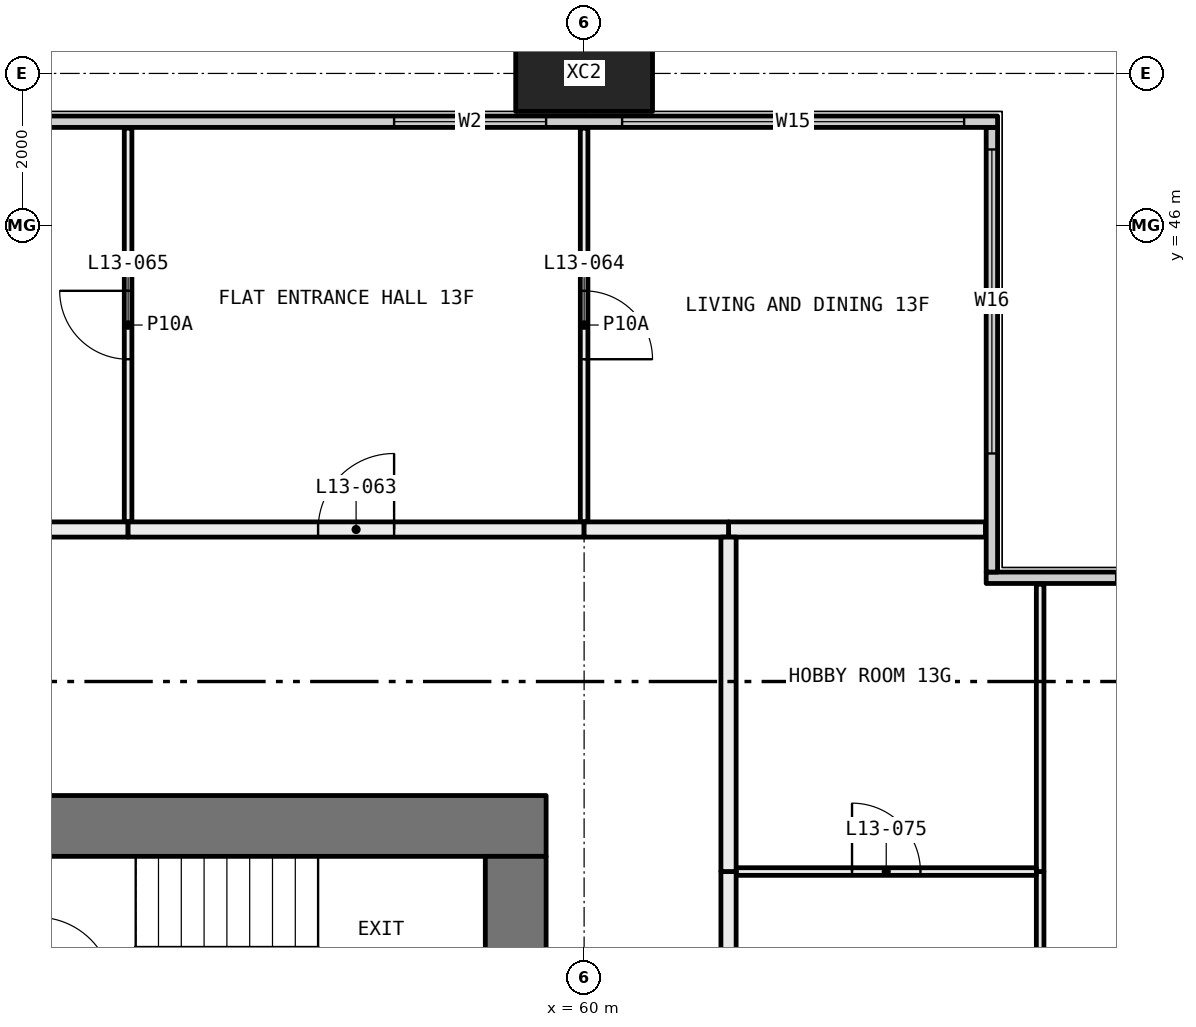
"""IFC4 building model, lengths in metres.
Left out: names, types, materials, properties, quantities, classifications, styles, units other than length and angle.
Written with IfcOpenShell. Run it as: python <this file> out.ifc"""

import sys

from ifc_helpers import new_model, si_unit, direction, frame, frame_2d, origin, origin_2d, place, context, subcontext, project, spatial, rectangle, hollow_rectangle, extrude, element, fill, save


model = new_model("IFC4")
c1 = context("Model", 3, precision=1e-05, world=origin(), true_north=direction((0.0, 1.0)))
c2 = subcontext(c1, "Body", "Model", "MODEL_VIEW")
j1 = project(units=[si_unit("LENGTHUNIT", "METRE"), si_unit("PLANEANGLEUNIT", "RADIAN")], contexts=[c1])
p1 = place(None, origin())
s1 = spatial("IfcSite", under=j1, at=p1, CompositionType="ELEMENT")
p2 = place(p1, origin())
s2 = spatial("IfcBuilding", under=s1, at=p2, CompositionType="ELEMENT")
p3 = place(p2, frame((0.0, 0.0, 57.6)))
s3 = spatial("IfcBuildingStorey", under=s2, at=p3, CompositionType="ELEMENT", Elevation=57.6)
p4 = place(p3, frame((60.0, 48.0, -0.4), z_axis=(0.0, 0.0, 1.0), x_axis=(1.0, 0.0, 0.0)))
e1 = element("IfcColumn", 1, at=p4, inside=s3, PredefinedType="COLUMN", context=c2, shape_type="SweptSolid", body=[
    extrude(hollow_rectangle(XDim=1.8, YDim=1.0, WallThickness=0.07, at=origin_2d()), origin(), (0.0, 0.0, 1.0), 3.45),
])
p5 = place(p3, frame((65.29, 41.365, 0.0), z_axis=(0.0, 0.0, 1.0), x_axis=(1.0, 0.0, 0.0)))
e2 = element("IfcWall", 2, at=p5, inside=s3, PredefinedType="ELEMENTEDWALL", context=c2, shape_type="SweptSolid", body=[
    extrude(rectangle(XDim=6.15, YDim=0.15, at=frame_2d((3.075, 0.0))), origin(), (0.0, 0.0, 1.0), 3.05),
])
p6 = place(p5, frame((1.71, 0.0, 0.45)))
e3 = element("IfcOpeningElement", 3, at=p6, cuts=e2, PredefinedType="OPENING", context=c2, shape_type="SweptSolid", body=[
    extrude(rectangle(XDim=4.0, YDim=2.55, at=frame_2d((2.0, 1.275))), frame((0.0, 0.085, 0.0), z_axis=(0.0, -1.0, 0.0), x_axis=(1.0, 0.0, 0.0)), (0.0, 0.0, 1.0), 0.17),
])
p7 = place(p3, frame((65.365, 41.44, 0.0), z_axis=(0.0, 0.0, 1.0), x_axis=(0.0, 1.0, 0.0)))
e4 = element("IfcWall", 4, at=p7, inside=s3, PredefinedType="ELEMENTEDWALL", context=c2, shape_type="SweptSolid", body=[
    extrude(rectangle(XDim=5.85, YDim=0.15, at=frame_2d((2.925, 0.0))), origin(), (0.0, 0.0, 1.0), 3.05),
])
p8 = place(p7, frame((1.56, 0.0, 0.45)))
e5 = element("IfcOpeningElement", 5, at=p8, cuts=e4, PredefinedType="OPENING", context=c2, shape_type="SweptSolid", body=[
    extrude(rectangle(XDim=4.0, YDim=2.55, at=frame_2d((2.0, 1.275))), frame((0.0, 0.085, 0.0), z_axis=(0.0, -1.0, 0.0), x_axis=(1.0, 0.0, 0.0)), (0.0, 0.0, 1.0), 0.17),
])
p9 = place(p3, frame((6.56, 47.365, 0.0), z_axis=(0.0, 0.0, 1.0), x_axis=(1.0, 0.0, 0.0)))
e6 = element("IfcWall", 6, at=p9, inside=s3, PredefinedType="ELEMENTEDWALL", context=c2, shape_type="SweptSolid", body=[
    extrude(rectangle(XDim=58.88, YDim=0.15, at=frame_2d((29.44, 0.0))), origin(), (0.0, 0.0, 1.0), 3.05),
])
p10 = place(p9, frame((0.44, 0.0, 0.45)))
e7 = element("IfcOpeningElement", 7, at=p10, cuts=e6, PredefinedType="OPENING", context=c2, shape_type="SweptSolid", body=[
    extrude(rectangle(XDim=4.5, YDim=2.55, at=frame_2d((2.25, 1.275))), frame((0.0, 0.085, 0.0), z_axis=(0.0, -1.0, 0.0), x_axis=(1.0, 0.0, 0.0)), (0.0, 0.0, 1.0), 0.17),
])
p11 = place(p9, frame((5.94, 0.0, 0.45)))
e8 = element("IfcOpeningElement", 8, at=p11, cuts=e6, PredefinedType="OPENING", context=c2, shape_type="SweptSolid", body=[
    extrude(rectangle(XDim=3.25, YDim=2.55, at=frame_2d((1.625, 1.275))), frame((0.0, 0.085, 0.0), z_axis=(0.0, -1.0, 0.0), x_axis=(1.0, 0.0, 0.0)), (0.0, 0.0, 1.0), 0.17),
])
p12 = place(p9, frame((13.69, 0.0, 0.45)))
e9 = element("IfcOpeningElement", 9, at=p12, cuts=e6, PredefinedType="OPENING", context=c2, shape_type="SweptSolid", body=[
    extrude(rectangle(XDim=3.25, YDim=2.55, at=frame_2d((1.625, 1.275))), frame((0.0, 0.085, 0.0), z_axis=(0.0, -1.0, 0.0), x_axis=(1.0, 0.0, 0.0)), (0.0, 0.0, 1.0), 0.17),
])
p13 = place(p9, frame((17.94, 0.0, 0.45)))
e10 = element("IfcOpeningElement", 10, at=p13, cuts=e6, PredefinedType="OPENING", context=c2, shape_type="SweptSolid", body=[
    extrude(rectangle(XDim=3.25, YDim=2.55, at=frame_2d((1.625, 1.275))), frame((0.0, 0.085, 0.0), z_axis=(0.0, -1.0, 0.0), x_axis=(1.0, 0.0, 0.0)), (0.0, 0.0, 1.0), 0.17),
])
p14 = place(p9, frame((26.94, 0.0, 0.45)))
e11 = element("IfcOpeningElement", 11, at=p14, cuts=e6, PredefinedType="OPENING", context=c2, shape_type="SweptSolid", body=[
    extrude(rectangle(XDim=2.0, YDim=2.55, at=frame_2d((1.0, 1.275))), frame((0.0, 0.085, 0.0), z_axis=(0.0, -1.0, 0.0), x_axis=(1.0, 0.0, 0.0)), (0.0, 0.0, 1.0), 0.17),
])
p15 = place(p9, frame((29.94, 0.0, 0.45)))
e12 = element("IfcOpeningElement", 12, at=p15, cuts=e6, PredefinedType="OPENING", context=c2, shape_type="SweptSolid", body=[
    extrude(rectangle(XDim=3.25, YDim=2.55, at=frame_2d((1.625, 1.275))), frame((0.0, 0.085, 0.0), z_axis=(0.0, -1.0, 0.0), x_axis=(1.0, 0.0, 0.0)), (0.0, 0.0, 1.0), 0.17),
])
p16 = place(p9, frame((37.69, 0.0, 0.45)))
e13 = element("IfcOpeningElement", 13, at=p16, cuts=e6, PredefinedType="OPENING", context=c2, shape_type="SweptSolid", body=[
    extrude(rectangle(XDim=3.25, YDim=2.55, at=frame_2d((1.625, 1.275))), frame((0.0, 0.085, 0.0), z_axis=(0.0, -1.0, 0.0), x_axis=(1.0, 0.0, 0.0)), (0.0, 0.0, 1.0), 0.17),
])
p17 = place(p9, frame((41.94, 0.0, 0.45)))
e14 = element("IfcOpeningElement", 14, at=p17, cuts=e6, PredefinedType="OPENING", context=c2, shape_type="SweptSolid", body=[
    extrude(rectangle(XDim=3.25, YDim=2.55, at=frame_2d((1.625, 1.275))), frame((0.0, 0.085, 0.0), z_axis=(0.0, -1.0, 0.0), x_axis=(1.0, 0.0, 0.0)), (0.0, 0.0, 1.0), 0.17),
])
p18 = place(p9, frame((50.94, 0.0, 0.45)))
e15 = element("IfcOpeningElement", 15, at=p18, cuts=e6, PredefinedType="OPENING", context=c2, shape_type="SweptSolid", body=[
    extrude(rectangle(XDim=2.0, YDim=2.55, at=frame_2d((1.0, 1.275))), frame((0.0, 0.085, 0.0), z_axis=(0.0, -1.0, 0.0), x_axis=(1.0, 0.0, 0.0)), (0.0, 0.0, 1.0), 0.17),
])
p19 = place(p9, frame((53.94, 0.0, 0.45)))
e16 = element("IfcOpeningElement", 16, at=p19, cuts=e6, PredefinedType="OPENING", context=c2, shape_type="SweptSolid", body=[
    extrude(rectangle(XDim=4.5, YDim=2.55, at=frame_2d((2.25, 1.275))), frame((0.0, 0.085, 0.0), z_axis=(0.0, -1.0, 0.0), x_axis=(1.0, 0.0, 0.0)), (0.0, 0.0, 1.0), 0.17),
])
p20 = place(p3, frame((54.0, 42.1, 0.0), z_axis=(0.0, 0.0, 1.0), x_axis=(0.0, 1.0, 0.0)))
e17 = element("IfcWall", 17, at=p20, inside=s3, PredefinedType="PARTITIONING", context=c2, shape_type="SweptSolid", body=[
    extrude(rectangle(XDim=5.18, YDim=0.1, at=frame_2d((2.59, 0.0))), origin(), (0.0, 0.0, 1.0), 3.05),
])
p21 = place(p20, frame((2.14, 0.0, 0.0)))
e18 = element("IfcOpeningElement", 18, at=p21, cuts=e17, PredefinedType="OPENING", context=c2, shape_type="SweptSolid", body=[
    extrude(rectangle(XDim=0.9, YDim=2.1, at=frame_2d((0.45, 1.05))), frame((0.0, 0.06, 0.0), z_axis=(0.0, -1.0, 0.0), x_axis=(1.0, 0.0, 0.0)), (0.0, 0.0, 1.0), 0.12),
])
p22 = place(p3, frame((48.0, 42.0, 0.0), z_axis=(0.0, 0.0, 1.0), x_axis=(1.0, 0.0, 0.0)))
e19 = element("IfcWall", 19, at=p22, inside=s3, PredefinedType="PARTITIONING", context=c2, shape_type="SweptSolid", body=[
    extrude(rectangle(XDim=6.0, YDim=0.2, at=frame_2d((3.0, 0.0))), origin(), (0.0, 0.0, 1.0), 3.05),
])
p23 = place(p3, frame((60.0, 42.1, 0.0), z_axis=(0.0, 0.0, 1.0), x_axis=(0.0, 1.0, 0.0)))
e20 = element("IfcWall", 20, at=p23, inside=s3, PredefinedType="PARTITIONING", context=c2, shape_type="SweptSolid", body=[
    extrude(rectangle(XDim=5.18, YDim=0.1, at=frame_2d((2.59, 0.0))), origin(), (0.0, 0.0, 1.0), 3.05),
])
p24 = place(p23, frame((2.14, 0.0, 0.0)))
e21 = element("IfcOpeningElement", 21, at=p24, cuts=e20, PredefinedType="OPENING", context=c2, shape_type="SweptSolid", body=[
    extrude(rectangle(XDim=0.9, YDim=2.1, at=frame_2d((0.45, 1.05))), frame((0.0, 0.06, 0.0), z_axis=(0.0, -1.0, 0.0), x_axis=(1.0, 0.0, 0.0)), (0.0, 0.0, 1.0), 0.12),
])
p25 = place(p3, frame((54.0, 42.0, 0.0), z_axis=(0.0, 0.0, 1.0), x_axis=(1.0, 0.0, 0.0)))
e22 = element("IfcWall", 22, at=p25, inside=s3, PredefinedType="PARTITIONING", context=c2, shape_type="SweptSolid", body=[
    extrude(rectangle(XDim=6.0, YDim=0.2, at=frame_2d((3.0, 0.0))), origin(), (0.0, 0.0, 1.0), 3.05),
])
p26 = place(p25, frame((2.5, 0.0, 0.0)))
e23 = element("IfcOpeningElement", 23, at=p26, cuts=e22, PredefinedType="OPENING", context=c2, shape_type="SweptSolid", body=[
    extrude(rectangle(XDim=1.0, YDim=2.1, at=frame_2d((0.5, 1.05))), frame((0.0, 0.11, 0.0), z_axis=(0.0, -1.0, 0.0), x_axis=(1.0, 0.0, 0.0)), (0.0, 0.0, 1.0), 0.22),
])
p27 = place(p3, frame((61.9, 42.0, 0.0), z_axis=(0.0, 0.0, 1.0), x_axis=(1.0, 0.0, 0.0)))
e24 = element("IfcWall", 24, at=p27, inside=s3, PredefinedType="PARTITIONING", context=c2, shape_type="SweptSolid", body=[
    extrude(rectangle(XDim=3.38, YDim=0.2, at=frame_2d((1.69, 0.0))), origin(), (0.0, 0.0, 1.0), 3.05),
])
p28 = place(p3, frame((60.0, 42.0, 0.0), z_axis=(0.0, 0.0, 1.0), x_axis=(1.0, 0.0, 0.0)))
e25 = element("IfcWall", 25, at=p28, inside=s3, PredefinedType="PARTITIONING", context=c2, shape_type="SweptSolid", body=[
    extrude(rectangle(XDim=1.9, YDim=0.2, at=frame_2d((0.95, 0.0))), origin(), (0.0, 0.0, 1.0), 3.05),
])
p29 = place(p3, frame((66.0, 37.5, 0.0), z_axis=(0.0, 0.0, 1.0), x_axis=(0.0, -1.0, 0.0)))
e26 = element("IfcWall", 26, at=p29, inside=s3, PredefinedType="PARTITIONING", context=c2, shape_type="SweptSolid", body=[
    extrude(rectangle(XDim=1.6, YDim=0.1, at=frame_2d((0.8, 0.0))), origin(), (0.0, 0.0, 1.0), 2.45),
])
p30 = place(p3, frame((66.0, 41.28, 0.0), z_axis=(0.0, 0.0, 1.0), x_axis=(0.0, -1.0, 0.0)))
e27 = element("IfcWall", 27, at=p30, inside=s3, PredefinedType="PARTITIONING", context=c2, shape_type="SweptSolid", body=[
    extrude(rectangle(XDim=3.78, YDim=0.1, at=frame_2d((1.89, 0.0))), origin(), (0.0, 0.0, 1.0), 3.05),
])
p31 = place(p3, frame((65.95, 37.5, 0.0), z_axis=(0.0, 0.0, 1.0), x_axis=(-1.0, 0.0, 0.0)))
e28 = element("IfcWall", 28, at=p31, inside=s3, PredefinedType="PARTITIONING", context=c2, shape_type="SweptSolid", body=[
    extrude(rectangle(XDim=3.95, YDim=0.1, at=frame_2d((1.975, 0.0))), origin(), (0.0, 0.0, 1.0), 3.05),
])
p32 = place(p31, frame((1.525, 0.0, 0.0)))
e29 = element("IfcOpeningElement", 29, at=p32, cuts=e28, PredefinedType="OPENING", context=c2, shape_type="SweptSolid", body=[
    extrude(rectangle(XDim=0.9, YDim=2.1, at=frame_2d((0.45, 1.05))), frame((0.0, 0.06, 0.0), z_axis=(0.0, -1.0, 0.0), x_axis=(1.0, 0.0, 0.0)), (0.0, 0.0, 1.0), 0.12),
])
p33 = place(p3, frame((61.9, 37.5, 0.0), z_axis=(0.0, 0.0, 1.0), x_axis=(0.0, -1.0, 0.0)))
e30 = element("IfcWall", 30, at=p33, inside=s3, PredefinedType="PARTITIONING", context=c2, shape_type="SweptSolid", body=[
    extrude(rectangle(XDim=1.6, YDim=0.2, at=frame_2d((0.8, 0.0))), origin(), (0.0, 0.0, 1.0), 2.45),
])
p34 = place(p3, frame((61.9, 41.9, 0.0), z_axis=(0.0, 0.0, 1.0), x_axis=(0.0, -1.0, 0.0)))
e31 = element("IfcWall", 31, at=p34, inside=s3, PredefinedType="PARTITIONING", context=c2, shape_type="SweptSolid", body=[
    extrude(rectangle(XDim=4.4, YDim=0.2, at=frame_2d((2.2, 0.0))), origin(), (0.0, 0.0, 1.0), 3.05),
])
p35 = place(p3, frame((59.5, 38.1, 0.0), z_axis=(0.0, 0.0, 1.0), x_axis=(-1.0, 0.0, 0.0)))
e32 = element("IfcWall", 32, at=p35, inside=s3, PredefinedType="SHEAR", context=c2, shape_type="SweptSolid", body=[
    extrude(rectangle(XDim=11.0, YDim=0.8, at=frame_2d((5.5, 0.0))), origin(), (0.0, 0.0, 1.0), 3.05),
])
p36 = place(p35, frame((8.4, 0.0, 0.0)))
e33 = element("IfcOpeningElement", 33, at=p36, cuts=e32, PredefinedType="OPENING", context=c2, shape_type="SweptSolid", body=[
    extrude(rectangle(XDim=1.6, YDim=2.1, at=frame_2d((0.8, 1.05))), frame((0.0, 0.41, 0.0), z_axis=(0.0, -1.0, 0.0), x_axis=(1.0, 0.0, 0.0)), (0.0, 0.0, 1.0), 0.82),
])
p37 = place(p3, frame((59.1, 22.3, 0.0), z_axis=(0.0, 0.0, 1.0), x_axis=(0.0, 1.0, 0.0)))
e34 = element("IfcWall", 34, at=p37, inside=s3, PredefinedType="SHEAR", context=c2, shape_type="SweptSolid", body=[
    extrude(rectangle(XDim=15.4, YDim=0.8, at=frame_2d((7.7, 0.0))), origin(), (0.0, 0.0, 1.0), 3.05),
])
p38 = place(p37, frame((8.15, 0.0, 0.0)))
e35 = element("IfcOpeningElement", 35, at=p38, cuts=e34, PredefinedType="OPENING", context=c2, shape_type="SweptSolid", body=[
    extrude(rectangle(XDim=1.6, YDim=2.1, at=frame_2d((0.8, 1.05))), frame((0.0, 0.41, 0.0), z_axis=(0.0, -1.0, 0.0), x_axis=(1.0, 0.0, 0.0)), (0.0, 0.0, 1.0), 0.82),
])
p39 = place(p37, frame((2.05, 0.0, 0.0)))
e36 = element("IfcOpeningElement", 36, at=p39, cuts=e34, PredefinedType="OPENING", context=c2, shape_type="SweptSolid", body=[
    extrude(rectangle(XDim=1.0, YDim=2.1, at=frame_2d((0.5, 1.05))), frame((0.0, 0.41, 0.0), z_axis=(0.0, -1.0, 0.0), x_axis=(1.0, 0.0, 0.0)), (0.0, 0.0, 1.0), 0.82),
])
p40 = place(p8, origin())
e37 = element("IfcWindow", 37, at=p40, inside=s3, PartitioningType="SINGLE_PANEL", PredefinedType="WINDOW", context=c2, shape_type="SweptSolid", body=[
    extrude(rectangle(XDim=4.0, YDim=2.55, at=frame_2d((2.0, 1.275))), frame((0.0, 0.03, 0.0), z_axis=(0.0, -1.0, 0.0), x_axis=(1.0, 0.0, 0.0)), (0.0, 0.0, 1.0), 0.06),
])
fill(e5, e37)
p41 = place(p18, origin())
e38 = element("IfcWindow", 38, at=p41, inside=s3, PartitioningType="SINGLE_PANEL", PredefinedType="WINDOW", context=c2, shape_type="SweptSolid", body=[
    extrude(rectangle(XDim=2.0, YDim=2.55, at=frame_2d((1.0, 1.275))), frame((0.0, 0.03, 0.0), z_axis=(0.0, -1.0, 0.0), x_axis=(1.0, 0.0, 0.0)), (0.0, 0.0, 1.0), 0.06),
])
fill(e15, e38)
p42 = place(p19, origin())
e39 = element("IfcWindow", 39, at=p42, inside=s3, PartitioningType="SINGLE_PANEL", PredefinedType="WINDOW", context=c2, shape_type="SweptSolid", body=[
    extrude(rectangle(XDim=4.5, YDim=2.55, at=frame_2d((2.25, 1.275))), frame((0.0, 0.03, 0.0), z_axis=(0.0, -1.0, 0.0), x_axis=(1.0, 0.0, 0.0)), (0.0, 0.0, 1.0), 0.06),
])
fill(e16, e39)
p43 = place(p26, origin())
e40 = element("IfcDoor", 40, at=p43, inside=s3, OperationType="SINGLE_SWING_LEFT", PredefinedType="DOOR", context=c2, shape_type="SweptSolid", body=[
    extrude(rectangle(XDim=1.0, YDim=2.1, at=frame_2d((0.5, 1.05))), frame((0.0, 0.025, 0.0), z_axis=(0.0, -1.0, 0.0), x_axis=(1.0, 0.0, 0.0)), (0.0, 0.0, 1.0), 0.05),
])
fill(e23, e40)
p44 = place(p24, frame((0.9, 0.0, 0.0), x_axis=(-1.0, 0.0, 0.0)))
e41 = element("IfcDoor", 41, at=p44, inside=s3, OperationType="SINGLE_SWING_LEFT", PredefinedType="DOOR", context=c2, shape_type="SweptSolid", body=[
    extrude(rectangle(XDim=0.9, YDim=2.1, at=frame_2d((0.45, 1.05))), frame((0.0, 0.025, 0.0), z_axis=(0.0, -1.0, 0.0), x_axis=(1.0, 0.0, 0.0)), (0.0, 0.0, 1.0), 0.05),
])
fill(e21, e41)
p45 = place(p21, origin())
e42 = element("IfcDoor", 42, at=p45, inside=s3, OperationType="SINGLE_SWING_LEFT", PredefinedType="DOOR", context=c2, shape_type="SweptSolid", body=[
    extrude(rectangle(XDim=0.9, YDim=2.1, at=frame_2d((0.45, 1.05))), frame((0.0, 0.025, 0.0), z_axis=(0.0, -1.0, 0.0), x_axis=(1.0, 0.0, 0.0)), (0.0, 0.0, 1.0), 0.05),
])
fill(e18, e42)
p46 = place(p32, frame((0.9, 0.0, 0.0), x_axis=(-1.0, 0.0, 0.0)))
e43 = element("IfcDoor", 43, at=p46, inside=s3, OperationType="SINGLE_SWING_RIGHT", PredefinedType="DOOR", context=c2, shape_type="SweptSolid", body=[
    extrude(rectangle(XDim=0.9, YDim=2.1, at=frame_2d((0.45, 1.05))), frame((0.0, 0.025, 0.0), z_axis=(0.0, -1.0, 0.0), x_axis=(1.0, 0.0, 0.0)), (0.0, 0.0, 1.0), 0.05),
])
fill(e29, e43)
save(model, sys.argv[1])
